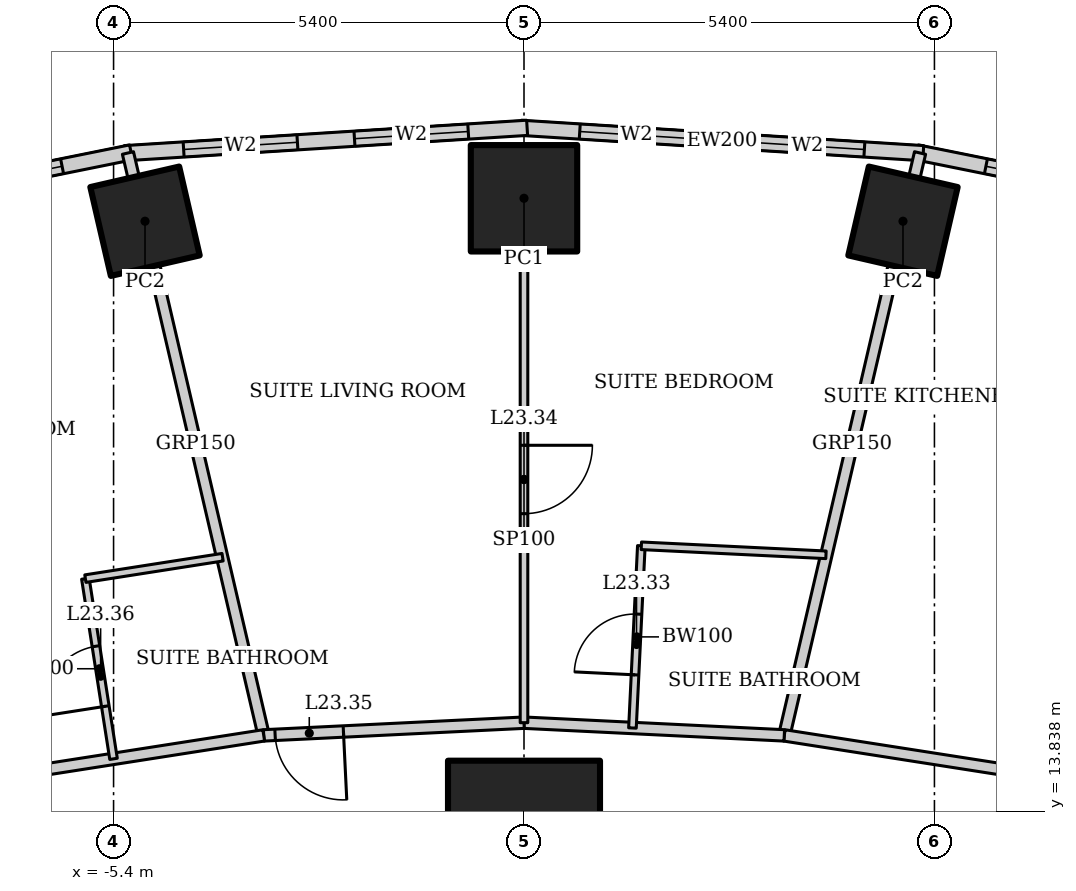
"""IFC4 building model, lengths in metres.
Left out: names, types, materials, properties, quantities, classifications, styles, units other than length and angle.
Written with IfcOpenShell. Run it as: python <this file> out.ifc"""

import sys

from ifc_helpers import new_model, si_unit, direction, frame, frame_2d, origin, origin_2d, place, context, subcontext, project, spatial, rectangle, hollow_rectangle, extrude, element, fill, save


model = new_model("IFC4")
c1 = context("Model", 3, precision=1e-05, world=origin(), true_north=direction((0.0, 1.0)))
c2 = subcontext(c1, "Body", "Model", "MODEL_VIEW")
j1 = project(units=[si_unit("LENGTHUNIT", "METRE"), si_unit("PLANEANGLEUNIT", "RADIAN")], contexts=[c1])
p1 = place(None, origin())
s1 = spatial("IfcSite", under=j1, at=p1, CompositionType="ELEMENT")
p2 = place(p1, origin())
s2 = spatial("IfcBuilding", under=s1, at=p2, CompositionType="ELEMENT")
p3 = place(p2, frame((0.0, 0.0, 98.2)))
s3 = spatial("IfcBuildingStorey", under=s2, at=p3, CompositionType="ELEMENT", Elevation=98.2)
p4 = place(p3, frame((0.0, 13.5, 0.0), z_axis=(0.0, 0.0, 1.0), x_axis=(1.0, 0.0, 0.0)))
e1 = element("IfcColumn", 1, at=p4, inside=s3, PredefinedType="COLUMN", context=c2, shape_type="SweptSolid", body=[
    extrude(hollow_rectangle(XDim=2.0, YDim=2.0, WallThickness=0.17, at=origin_2d()), origin(), (0.0, 0.0, 1.0), 3.6),
])
p5 = place(p3, frame((4.986, 21.598, 0.0), z_axis=(0.0, 0.0, 1.0), x_axis=(0.224951054344, 0.974370064785, 0.0)))
e2 = element("IfcColumn", 2, at=p5, inside=s3, PredefinedType="COLUMN", context=c2, shape_type="SweptSolid", body=[
    extrude(hollow_rectangle(XDim=1.2, YDim=1.2, WallThickness=0.1, at=origin_2d()), origin(), (0.0, 0.0, 1.0), 3.6),
])
p6 = place(p3, frame((0.0, 21.9, 0.0), z_axis=(0.0, 0.0, 1.0), x_axis=(1.0, 0.0, 0.0)))
e3 = element("IfcColumn", 3, at=p6, inside=s3, PredefinedType="COLUMN", context=c2, shape_type="SweptSolid", body=[
    extrude(hollow_rectangle(XDim=1.4, YDim=1.4, WallThickness=0.1, at=origin_2d()), origin(), (0.0, 0.0, 1.0), 3.6),
])
p7 = place(p3, frame((-4.986, 21.598, 0.0), z_axis=(0.0, 0.0, 1.0), x_axis=(0.974370064785, 0.224951054344, 0.0)))
e4 = element("IfcColumn", 4, at=p7, inside=s3, PredefinedType="COLUMN", context=c2, shape_type="SweptSolid", body=[
    extrude(hollow_rectangle(XDim=1.2, YDim=1.2, WallThickness=0.1, at=origin_2d()), origin(), (0.0, 0.0, 1.0), 3.6),
])
p8 = place(p3, frame((10.957, 21.337, 0.0), z_axis=(0.0, 0.0, 1.0), x_axis=(-0.980251657452, 0.197754110105, 0.0)))
e5 = element("IfcWall", 5, at=p8, inside=s3, PredefinedType="SOLIDWALL", context=c2, shape_type="SweptSolid", body=[
    extrude(rectangle(XDim=5.904, YDim=0.2, at=frame_2d((2.952, 0.0))), origin(), (0.0, 0.0, 1.0), 3.45),
])
p9 = place(p8, frame((0.926, 0.0, 0.5)))
e6 = element("IfcOpeningElement", 6, at=p9, cuts=e5, PredefinedType="OPENING", context=c2, shape_type="SweptSolid", body=[
    extrude(rectangle(XDim=1.5, YDim=2.2, at=frame_2d((0.75, 1.1))), frame((0.0, 0.11, 0.0), z_axis=(0.0, -1.0, 0.0), x_axis=(1.0, 0.0, 0.0)), (0.0, 0.0, 1.0), 0.22),
])
p10 = place(p8, frame((3.478, 0.0, 0.5)))
e7 = element("IfcOpeningElement", 7, at=p10, cuts=e5, PredefinedType="OPENING", context=c2, shape_type="SweptSolid", body=[
    extrude(rectangle(XDim=1.5, YDim=2.2, at=frame_2d((0.75, 1.1))), frame((0.0, 0.11, 0.0), z_axis=(0.0, -1.0, 0.0), x_axis=(1.0, 0.0, 0.0)), (0.0, 0.0, 1.0), 0.22),
])
p11 = place(p3, frame((5.253, 22.493, 0.0), z_axis=(0.0, 0.0, 1.0), x_axis=(-0.998018582375, 0.062919863585, 0.0)))
e8 = element("IfcWall", 8, at=p11, inside=s3, PredefinedType="SOLIDWALL", context=c2, shape_type="SweptSolid", body=[
    extrude(rectangle(XDim=5.304, YDim=0.2, at=frame_2d((2.652, 0.0))), origin(), (0.0, 0.0, 1.0), 3.45),
])
p12 = place(p11, frame((0.776, 0.0, 0.5)))
e9 = element("IfcOpeningElement", 9, at=p12, cuts=e8, PredefinedType="OPENING", context=c2, shape_type="SweptSolid", body=[
    extrude(rectangle(XDim=1.5, YDim=2.2, at=frame_2d((0.75, 1.1))), frame((0.0, 0.11, 0.0), z_axis=(0.0, -1.0, 0.0), x_axis=(1.0, 0.0, 0.0)), (0.0, 0.0, 1.0), 0.22),
])
p13 = place(p11, frame((3.028, 0.0, 0.5)))
e10 = element("IfcOpeningElement", 10, at=p13, cuts=e8, PredefinedType="OPENING", context=c2, shape_type="SweptSolid", body=[
    extrude(rectangle(XDim=1.5, YDim=2.2, at=frame_2d((0.75, 1.1))), frame((0.0, 0.11, 0.0), z_axis=(0.0, -1.0, 0.0), x_axis=(1.0, 0.0, 0.0)), (0.0, 0.0, 1.0), 0.22),
])
p14 = place(p3, frame((0.041, 22.827, 0.0), z_axis=(0.0, 0.0, 1.0), x_axis=(-0.998018582375, -0.062919863585, 0.0)))
e11 = element("IfcWall", 11, at=p14, inside=s3, PredefinedType="SOLIDWALL", context=c2, shape_type="SweptSolid", body=[
    extrude(rectangle(XDim=5.304, YDim=0.2, at=frame_2d((2.652, 0.0))), origin(), (0.0, 0.0, 1.0), 3.45),
])
p15 = place(p14, frame((0.776, 0.0, 0.5)))
e12 = element("IfcOpeningElement", 12, at=p15, cuts=e11, PredefinedType="OPENING", context=c2, shape_type="SweptSolid", body=[
    extrude(rectangle(XDim=1.5, YDim=2.2, at=frame_2d((0.75, 1.1))), frame((0.0, 0.11, 0.0), z_axis=(0.0, -1.0, 0.0), x_axis=(1.0, 0.0, 0.0)), (0.0, 0.0, 1.0), 0.22),
])
p16 = place(p14, frame((3.028, 0.0, 0.5)))
e13 = element("IfcOpeningElement", 13, at=p16, cuts=e11, PredefinedType="OPENING", context=c2, shape_type="SweptSolid", body=[
    extrude(rectangle(XDim=1.5, YDim=2.2, at=frame_2d((0.75, 1.1))), frame((0.0, 0.11, 0.0), z_axis=(0.0, -1.0, 0.0), x_axis=(1.0, 0.0, 0.0)), (0.0, 0.0, 1.0), 0.22),
])
p17 = place(p3, frame((-5.17, 22.504, 0.0), z_axis=(0.0, 0.0, 1.0), x_axis=(-0.980251657452, -0.197754110105, 0.0)))
e14 = element("IfcWall", 14, at=p17, inside=s3, PredefinedType="SOLIDWALL", context=c2, shape_type="SweptSolid", body=[
    extrude(rectangle(XDim=5.904, YDim=0.2, at=frame_2d((2.952, 0.0))), origin(), (0.0, 0.0, 1.0), 3.45),
])
p18 = place(p17, frame((0.926, 0.0, 0.5)))
e15 = element("IfcOpeningElement", 15, at=p18, cuts=e14, PredefinedType="OPENING", context=c2, shape_type="SweptSolid", body=[
    extrude(rectangle(XDim=1.5, YDim=2.2, at=frame_2d((0.75, 1.1))), frame((0.0, 0.11, 0.0), z_axis=(0.0, -1.0, 0.0), x_axis=(1.0, 0.0, 0.0)), (0.0, 0.0, 1.0), 0.22),
])
p19 = place(p17, frame((3.478, 0.0, 0.5)))
e16 = element("IfcOpeningElement", 16, at=p19, cuts=e14, PredefinedType="OPENING", context=c2, shape_type="SweptSolid", body=[
    extrude(rectangle(XDim=1.5, YDim=2.2, at=frame_2d((0.75, 1.1))), frame((0.0, 0.11, 0.0), z_axis=(0.0, -1.0, 0.0), x_axis=(1.0, 0.0, 0.0)), (0.0, 0.0, 1.0), 0.22),
])
for number, where, z_axis, x_axis in (
    (17, (5.211, 22.496, 0.0), (0.0, 0.0, 1.0), (-0.227, -0.974, 0.0)),
    (18, (-5.211, 22.496, 0.0), (0.0, 0.0, 1.0), (0.227, -0.974, 0.0)),
):
    element("IfcWall", number, at=place(p3, frame(where, z_axis=z_axis, x_axis=x_axis)), inside=s3, PredefinedType="PARTITIONING", context=c2, shape_type="SweptSolid", body=[
        extrude(rectangle(XDim=7.869, YDim=0.15, at=frame_2d((3.934, 0.0))), origin(), (0.0, 0.0, 1.0), 2.767),
    ])
p20 = place(p3, frame((7.253, 14.235, 0.0), z_axis=(0.0, 0.0, 1.0), x_axis=(-0.988015036573, 0.154357660987, 0.0)))
e19 = element("IfcWall", 19, at=p20, inside=s3, PredefinedType="PARTITIONING", context=c2, shape_type="SweptSolid", body=[
    extrude(rectangle(XDim=3.875, YDim=0.15, at=frame_2d((1.938, 0.0))), origin(), (0.0, 0.0, 1.0), 3.45),
])
p21 = place(p3, frame((3.424, 14.833, 0.0), z_axis=(0.0, 0.0, 1.0), x_axis=(-0.998809560203, 0.048779733975, 0.0)))
e20 = element("IfcWall", 20, at=p21, inside=s3, PredefinedType="PARTITIONING", context=c2, shape_type="SweptSolid", body=[
    extrude(rectangle(XDim=3.428, YDim=0.15, at=frame_2d((1.714, 0.0))), origin(), (0.0, 0.0, 1.0), 3.45),
])
p22 = place(p3, frame((0.0, 15.0, 0.0), z_axis=(0.0, 0.0, 1.0), x_axis=(-0.998809560203, -0.048779733975, 0.0)))
e21 = element("IfcWall", 21, at=p22, inside=s3, PredefinedType="PARTITIONING", context=c2, shape_type="SweptSolid", body=[
    extrude(rectangle(XDim=3.428, YDim=0.15, at=frame_2d((1.714, 0.0))), origin(), (0.0, 0.0, 1.0), 3.45),
])
p23 = place(p22, frame((2.378, 0.0, 0.0)))
e22 = element("IfcOpeningElement", 22, at=p23, cuts=e21, PredefinedType="OPENING", context=c2, shape_type="SweptSolid", body=[
    extrude(rectangle(XDim=0.9, YDim=2.1, at=frame_2d((0.45, 1.05))), frame((0.0, 0.085, 0.0), z_axis=(0.0, -1.0, 0.0), x_axis=(1.0, 0.0, 0.0)), (0.0, 0.0, 1.0), 0.17),
])
p24 = place(p3, frame((-3.424, 14.833, 0.0), z_axis=(0.0, 0.0, 1.0), x_axis=(-0.988015036573, -0.154357660987, 0.0)))
e23 = element("IfcWall", 23, at=p24, inside=s3, PredefinedType="PARTITIONING", context=c2, shape_type="SweptSolid", body=[
    extrude(rectangle(XDim=3.875, YDim=0.15, at=frame_2d((1.938, 0.0))), origin(), (0.0, 0.0, 1.0), 3.45),
])
p25 = place(p3, frame((1.427, 14.93, 0.0), z_axis=(0.0, 0.0, 1.0), x_axis=(0.048831470304, 0.998807032168, 0.0)))
e24 = element("IfcWall", 24, at=p25, inside=s3, PredefinedType="PARTITIONING", context=c2, shape_type="SweptSolid", body=[
    extrude(rectangle(XDim=2.4, YDim=0.1, at=frame_2d((1.2, 0.0))), origin(), (0.0, 0.0, 1.0), 3.45),
])
p26 = place(p25, frame((0.7, 0.0, 0.0)))
e25 = element("IfcOpeningElement", 25, at=p26, cuts=e24, PredefinedType="OPENING", context=c2, shape_type="SweptSolid", body=[
    extrude(rectangle(XDim=0.8, YDim=2.1, at=frame_2d((0.4, 1.05))), frame((0.0, 0.06, 0.0), z_axis=(0.0, -1.0, 0.0), x_axis=(1.0, 0.0, 0.0)), (0.0, 0.0, 1.0), 0.12),
])
p27 = place(p3, frame((1.544, 17.327, 0.0), z_axis=(0.0, 0.0, 1.0), x_axis=(0.998813899717, -0.048690797202, 0.0)))
e26 = element("IfcWall", 26, at=p27, inside=s3, PredefinedType="PARTITIONING", context=c2, shape_type="SweptSolid", body=[
    extrude(rectangle(XDim=2.432, YDim=0.1, at=frame_2d((1.216, 0.0))), origin(), (0.0, 0.0, 1.0), 3.45),
])
p28 = place(p3, frame((0.0, 21.4, 0.0), z_axis=(0.0, 0.0, 1.0), x_axis=(0.0, -1.0, 0.0)))
e27 = element("IfcWall", 27, at=p28, inside=s3, PredefinedType="PARTITIONING", context=c2, shape_type="SweptSolid", body=[
    extrude(rectangle(XDim=6.4, YDim=0.1, at=frame_2d((3.2, 0.0))), origin(), (0.0, 0.0, 1.0), 2.924),
])
p29 = place(p28, frame((2.75, 0.0, 0.0)))
e28 = element("IfcOpeningElement", 28, at=p29, cuts=e27, PredefinedType="OPENING", context=c2, shape_type="SweptSolid", body=[
    extrude(rectangle(XDim=0.9, YDim=2.1, at=frame_2d((0.45, 1.05))), frame((0.0, 0.06, 0.0), z_axis=(0.0, -1.0, 0.0), x_axis=(1.0, 0.0, 0.0)), (0.0, 0.0, 1.0), 0.12),
])
p30 = place(p3, frame((-5.4, 14.524, 0.0), z_axis=(0.0, 0.0, 1.0), x_axis=(-0.154426532979, 0.988004274238, 0.0)))
e29 = element("IfcWall", 29, at=p30, inside=s3, PredefinedType="PARTITIONING", context=c2, shape_type="SweptSolid", body=[
    extrude(rectangle(XDim=2.4, YDim=0.1, at=frame_2d((1.2, 0.0))), origin(), (0.0, 0.0, 1.0), 3.45),
])
p31 = place(p30, frame((0.7, 0.0, 0.0)))
e30 = element("IfcOpeningElement", 30, at=p31, cuts=e29, PredefinedType="OPENING", context=c2, shape_type="SweptSolid", body=[
    extrude(rectangle(XDim=0.8, YDim=2.1, at=frame_2d((0.4, 1.05))), frame((0.0, 0.06, 0.0), z_axis=(0.0, -1.0, 0.0), x_axis=(1.0, 0.0, 0.0)), (0.0, 0.0, 1.0), 0.12),
])
p32 = place(p3, frame((-5.771, 16.895, 0.0), z_axis=(0.0, 0.0, 1.0), x_axis=(0.98801840204, 0.154336117711, 0.0)))
e31 = element("IfcWall", 31, at=p32, inside=s3, PredefinedType="PARTITIONING", context=c2, shape_type="SweptSolid", body=[
    extrude(rectangle(XDim=1.827, YDim=0.1, at=frame_2d((0.914, 0.0))), origin(), (0.0, 0.0, 1.0), 3.45),
])
p33 = place(p10, origin())
e32 = element("IfcWindow", 32, at=p33, inside=s3, PartitioningType="SINGLE_PANEL", PredefinedType="WINDOW", context=c2, shape_type="SweptSolid", body=[
    extrude(rectangle(XDim=1.5, YDim=2.2, at=frame_2d((0.75, 1.1))), frame((0.0, 0.03, 0.0), z_axis=(0.0, -1.0, 0.0), x_axis=(1.0, 0.0, 0.0)), (0.0, 0.0, 1.0), 0.06),
])
fill(e7, e32)
p34 = place(p12, origin())
e33 = element("IfcWindow", 33, at=p34, inside=s3, PartitioningType="SINGLE_PANEL", PredefinedType="WINDOW", context=c2, shape_type="SweptSolid", body=[
    extrude(rectangle(XDim=1.5, YDim=2.2, at=frame_2d((0.75, 1.1))), frame((0.0, 0.03, 0.0), z_axis=(0.0, -1.0, 0.0), x_axis=(1.0, 0.0, 0.0)), (0.0, 0.0, 1.0), 0.06),
])
fill(e9, e33)
p35 = place(p13, origin())
e34 = element("IfcWindow", 34, at=p35, inside=s3, PartitioningType="SINGLE_PANEL", PredefinedType="WINDOW", context=c2, shape_type="SweptSolid", body=[
    extrude(rectangle(XDim=1.5, YDim=2.2, at=frame_2d((0.75, 1.1))), frame((0.0, 0.03, 0.0), z_axis=(0.0, -1.0, 0.0), x_axis=(1.0, 0.0, 0.0)), (0.0, 0.0, 1.0), 0.06),
])
fill(e10, e34)
p36 = place(p15, origin())
e35 = element("IfcWindow", 35, at=p36, inside=s3, PartitioningType="SINGLE_PANEL", PredefinedType="WINDOW", context=c2, shape_type="SweptSolid", body=[
    extrude(rectangle(XDim=1.5, YDim=2.2, at=frame_2d((0.75, 1.1))), frame((0.0, 0.03, 0.0), z_axis=(0.0, -1.0, 0.0), x_axis=(1.0, 0.0, 0.0)), (0.0, 0.0, 1.0), 0.06),
])
fill(e12, e35)
p37 = place(p16, origin())
e36 = element("IfcWindow", 36, at=p37, inside=s3, PartitioningType="SINGLE_PANEL", PredefinedType="WINDOW", context=c2, shape_type="SweptSolid", body=[
    extrude(rectangle(XDim=1.5, YDim=2.2, at=frame_2d((0.75, 1.1))), frame((0.0, 0.03, 0.0), z_axis=(0.0, -1.0, 0.0), x_axis=(1.0, 0.0, 0.0)), (0.0, 0.0, 1.0), 0.06),
])
fill(e13, e36)
p38 = place(p18, origin())
e37 = element("IfcWindow", 37, at=p38, inside=s3, PartitioningType="SINGLE_PANEL", PredefinedType="WINDOW", context=c2, shape_type="SweptSolid", body=[
    extrude(rectangle(XDim=1.5, YDim=2.2, at=frame_2d((0.75, 1.1))), frame((0.0, 0.03, 0.0), z_axis=(0.0, -1.0, 0.0), x_axis=(1.0, 0.0, 0.0)), (0.0, 0.0, 1.0), 0.06),
])
fill(e15, e37)
p39 = place(p26, origin())
e38 = element("IfcDoor", 38, at=p39, inside=s3, OperationType="SINGLE_SWING_LEFT", PredefinedType="DOOR", context=c2, shape_type="SweptSolid", body=[
    extrude(rectangle(XDim=0.8, YDim=2.1, at=frame_2d((0.4, 1.05))), frame((0.0, 0.025, 0.0), z_axis=(0.0, -1.0, 0.0), x_axis=(1.0, 0.0, 0.0)), (0.0, 0.0, 1.0), 0.05),
])
fill(e25, e38)
p40 = place(p29, origin())
e39 = element("IfcDoor", 39, at=p40, inside=s3, OperationType="SINGLE_SWING_LEFT", PredefinedType="DOOR", context=c2, shape_type="SweptSolid", body=[
    extrude(rectangle(XDim=0.9, YDim=2.1, at=frame_2d((0.45, 1.05))), frame((0.0, 0.025, 0.0), z_axis=(0.0, -1.0, 0.0), x_axis=(1.0, 0.0, 0.0)), (0.0, 0.0, 1.0), 0.05),
])
fill(e28, e39)
p41 = place(p23, origin())
e40 = element("IfcDoor", 40, at=p41, inside=s3, OperationType="SINGLE_SWING_LEFT", PredefinedType="DOOR", context=c2, shape_type="SweptSolid", body=[
    extrude(rectangle(XDim=0.9, YDim=2.1, at=frame_2d((0.45, 1.05))), frame((0.0, 0.025, 0.0), z_axis=(0.0, -1.0, 0.0), x_axis=(1.0, 0.0, 0.0)), (0.0, 0.0, 1.0), 0.05),
])
fill(e22, e40)
p42 = place(p31, origin())
e41 = element("IfcDoor", 41, at=p42, inside=s3, OperationType="SINGLE_SWING_LEFT", PredefinedType="DOOR", context=c2, shape_type="SweptSolid", body=[
    extrude(rectangle(XDim=0.8, YDim=2.1, at=frame_2d((0.4, 1.05))), frame((0.0, 0.025, 0.0), z_axis=(0.0, -1.0, 0.0), x_axis=(1.0, 0.0, 0.0)), (0.0, 0.0, 1.0), 0.05),
])
fill(e30, e41)
save(model, sys.argv[1])
